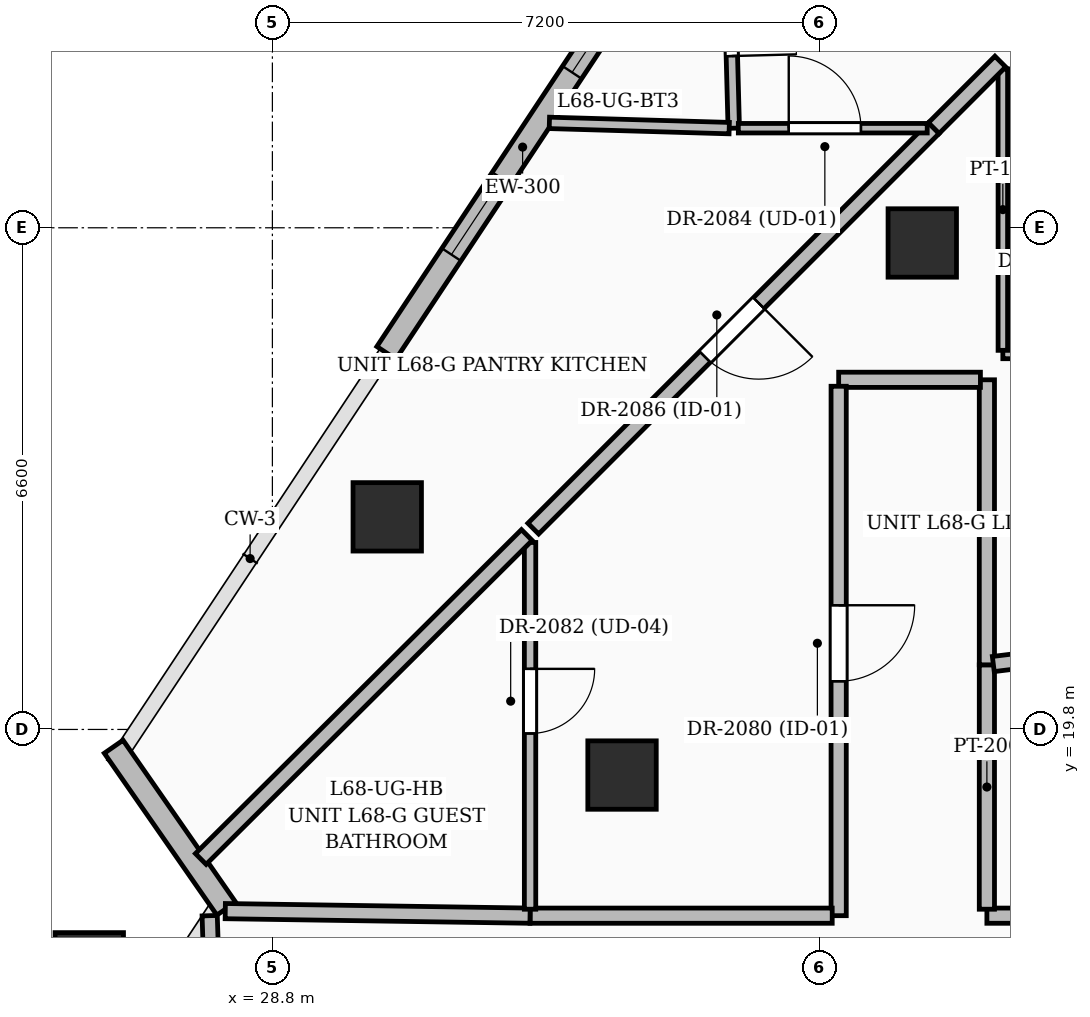
"""IFC4 building model, lengths in metres.
Left out: names, types, materials, properties, quantities, classifications, styles, units other than length and angle.
Written with IfcOpenShell. Run it as: python <this file> out.ifc"""

import sys

from ifc_helpers import new_model, si_unit, direction, frame, frame_2d, origin, origin_2d, place, context, subcontext, project, spatial, rectangle, extrude, element, fill, save


model = new_model("IFC4")
c1 = context("Model", 3, precision=1e-05, world=origin(), true_north=direction((0.0, 1.0)))
c2 = subcontext(c1, "Body", "Model", "MODEL_VIEW")
j1 = project(units=[si_unit("LENGTHUNIT", "METRE"), si_unit("PLANEANGLEUNIT", "RADIAN")], contexts=[c1])
p1 = place(None, origin())
s1 = spatial("IfcSite", under=j1, at=p1, CompositionType="ELEMENT")
p2 = place(p1, origin())
s2 = spatial("IfcBuilding", under=s1, at=p2, CompositionType="ELEMENT")
p3 = place(p2, frame((0.0, 0.0, 263.25)))
s3 = spatial("IfcBuildingStorey", under=s2, at=p3, CompositionType="ELEMENT", Elevation=263.25)
for number, where, z_axis, x_axis in (
    (1, (37.35, 26.2, 0.0), (0.0, 0.0, 1.0), (1.0, 0.0, 0.0)),
    (2, (33.4, 19.2, 0.0), (0.0, 0.0, 1.0), (1.0, 0.0, 0.0)),
    (3, (30.311, 22.597, 0.0), (0.0, 0.0, 1.0), (1.0, 0.0, 0.0)),
    (4, (26.391, 16.677, 0.0), (0.0, 0.0, 1.0), (1.0, 0.0, 0.0)),
):
    element("IfcColumn", number, at=place(p3, frame(where, z_axis=z_axis, x_axis=x_axis)), inside=s3, PredefinedType="COLUMN", context=c2, shape_type="SweptSolid", body=[
        extrude(rectangle(XDim=0.9, YDim=0.9, at=origin_2d()), origin(), (0.0, 0.0, 1.0), 3.75),
    ])
p4 = place(p3, frame((28.193, 17.443, 0.0), z_axis=(0.0, 0.0, 1.0), x_axis=(-0.570819039355, 0.821075894367, 0.0)))
e5 = element("IfcWall", 5, at=p4, inside=s3, PredefinedType="SOLIDWALL", context=c2, shape_type="SweptSolid", body=[
    extrude(rectangle(XDim=2.594, YDim=0.3, at=frame_2d((1.297, 0.0))), origin(), (0.0, 0.0, 1.0), 2.825),
])
p5 = place(p3, frame((30.3, 24.755, 0.0), z_axis=(0.0, 0.0, 1.0), x_axis=(0.552146443909, 0.833747146609, 0.0)))
e6 = element("IfcWall", 6, at=p5, inside=s3, PredefinedType="SOLIDWALL", context=c2, shape_type="SweptSolid", body=[
    extrude(rectangle(XDim=6.493, YDim=0.3, at=frame_2d((3.246, 0.0))), origin(), (0.0, 0.0, 1.0), 3.5),
])
p6 = place(p5, frame((4.425, 0.0, 0.8)))
e7 = element("IfcOpeningElement", 7, at=p6, cuts=e6, PredefinedType="OPENING", context=c2, shape_type="SweptSolid", body=[
    extrude(rectangle(XDim=1.2, YDim=1.8, at=frame_2d((0.6, 0.9))), frame((0.0, 0.16, 0.0), z_axis=(0.0, -1.0, 0.0), x_axis=(1.0, 0.0, 0.0)), (0.0, 0.0, 1.0), 0.32),
])
p7 = place(p5, frame((1.55, 0.0, 0.8)))
e8 = element("IfcOpeningElement", 8, at=p7, cuts=e6, PredefinedType="OPENING", context=c2, shape_type="SweptSolid", body=[
    extrude(rectangle(XDim=1.2, YDim=1.8, at=frame_2d((0.6, 0.9))), frame((0.0, 0.16, 0.0), z_axis=(0.0, -1.0, 0.0), x_axis=(1.0, 0.0, 0.0)), (0.0, 0.0, 1.0), 0.32),
])
p8 = place(p3, frame((27.975, 17.35, 0.0), z_axis=(0.0, 0.0, 1.0), x_axis=(0.032569486082, -0.999469473559, 0.0)))
e9 = element("IfcWall", 9, at=p8, inside=s3, PredefinedType="PARTITIONING", context=c2, shape_type="SweptSolid", body=[
    extrude(rectangle(XDim=2.301, YDim=0.2, at=frame_2d((1.151, 0.0))), origin(), (0.0, 0.0, 1.0), 3.5),
])
p9 = place(p8, frame((1.077, 0.0, 0.0)))
e10 = element("IfcOpeningElement", 10, at=p9, cuts=e9, PredefinedType="OPENING", context=c2, shape_type="SweptSolid", body=[
    extrude(rectangle(XDim=0.85, YDim=2.1, at=frame_2d((0.425, 1.05))), frame((0.0, 0.11, 0.0), z_axis=(0.0, -1.0, 0.0), x_axis=(1.0, 0.0, 0.0)), (0.0, 0.0, 1.0), 0.22),
])
p10 = place(p3, frame((44.0, 17.35, 0.0), z_axis=(0.0, 0.0, 1.0), x_axis=(-1.0, 0.0, 0.0)))
e11 = element("IfcWall", 11, at=p10, inside=s3, PredefinedType="PARTITIONING", context=c2, shape_type="SweptSolid", body=[
    extrude(rectangle(XDim=5.8, YDim=0.2, at=frame_2d((2.9, 0.0))), origin(), (0.0, 0.0, 1.0), 3.5),
])
p11 = place(p10, frame((2.391, 0.0, 0.0)))
e12 = element("IfcOpeningElement", 12, at=p11, cuts=e11, PredefinedType="OPENING", context=c2, shape_type="SweptSolid", body=[
    extrude(rectangle(XDim=0.9, YDim=2.1, at=frame_2d((0.45, 1.05))), frame((0.0, 0.11, 0.0), z_axis=(0.0, -1.0, 0.0), x_axis=(1.0, 0.0, 0.0)), (0.0, 0.0, 1.0), 0.22),
])
p12 = place(p3, frame((38.2, 17.435, 0.0), z_axis=(0.0, 0.0, 1.0), x_axis=(0.0, 1.0, 0.0)))
e13 = element("IfcWall", 13, at=p12, inside=s3, PredefinedType="PARTITIONING", context=c2, shape_type="SweptSolid", body=[
    extrude(rectangle(XDim=3.215, YDim=0.2, at=frame_2d((1.607, 0.0))), origin(), (0.0, 0.0, 1.0), 3.5),
])
p13 = place(p3, frame((38.2, 20.65, 0.0), z_axis=(0.0, 0.0, 1.0), x_axis=(0.0, 1.0, 0.0)))
e14 = element("IfcWall", 14, at=p13, inside=s3, PredefinedType="PARTITIONING", context=c2, shape_type="SweptSolid", body=[
    extrude(rectangle(XDim=3.75, YDim=0.2, at=frame_2d((1.875, 0.0))), origin(), (0.0, 0.0, 1.0), 3.5),
])
p14 = place(p3, frame((38.115, 24.4, 0.0), z_axis=(0.0, 0.0, 1.0), x_axis=(-1.0, 0.0, 0.0)))
e15 = element("IfcWall", 15, at=p14, inside=s3, PredefinedType="PARTITIONING", context=c2, shape_type="SweptSolid", body=[
    extrude(rectangle(XDim=1.865, YDim=0.2, at=frame_2d((0.933, 0.0))), origin(), (0.0, 0.0, 1.0), 2.685),
])
p15 = place(p3, frame((36.25, 24.315, 0.0), z_axis=(0.0, 0.0, 1.0), x_axis=(0.0, -1.0, 0.0)))
e16 = element("IfcWall", 16, at=p15, inside=s3, PredefinedType="PARTITIONING", context=c2, shape_type="SweptSolid", body=[
    extrude(rectangle(XDim=6.965, YDim=0.2, at=frame_2d((3.482, 0.0))), origin(), (0.0, 0.0, 1.0), 2.685),
])
p16 = place(p15, frame((2.881, 0.0, 0.0)))
e17 = element("IfcOpeningElement", 17, at=p16, cuts=e16, PredefinedType="OPENING", context=c2, shape_type="SweptSolid", body=[
    extrude(rectangle(XDim=1.0, YDim=2.2, at=frame_2d((0.5, 1.1))), frame((0.0, 0.11, 0.0), z_axis=(0.0, -1.0, 0.0), x_axis=(1.0, 0.0, 0.0)), (0.0, 0.0, 1.0), 0.22),
])
p17 = place(p3, frame((36.165, 17.35, 0.0), z_axis=(0.0, 0.0, 1.0), x_axis=(-1.0, 0.0, 0.0)))
e18 = element("IfcWall", 18, at=p17, inside=s3, PredefinedType="PARTITIONING", context=c2, shape_type="SweptSolid", body=[
    extrude(rectangle(XDim=3.975, YDim=0.2, at=frame_2d((1.988, 0.0))), origin(), (0.0, 0.0, 1.0), 2.685),
])
p18 = place(p3, frame((32.19, 17.35, 0.0), z_axis=(0.0, 0.0, 1.0), x_axis=(-0.999888770764, 0.014914627022, 0.0)))
e19 = element("IfcWall", 19, at=p18, inside=s3, PredefinedType="PARTITIONING", context=c2, shape_type="SweptSolid", body=[
    extrude(rectangle(XDim=4.01, YDim=0.2, at=frame_2d((2.005, 0.0))), origin(), (0.0, 0.0, 1.0), 3.5),
])
p19 = place(p3, frame((43.12, 21.26, 0.0), z_axis=(0.0, 0.0, 1.0), x_axis=(-0.992399953156, -0.123054187154, 0.0)))
e20 = element("IfcWall", 20, at=p19, inside=s3, PredefinedType="PARTITIONING", context=c2, shape_type="SweptSolid", body=[
    extrude(rectangle(XDim=4.873, YDim=0.2, at=frame_2d((2.437, 0.0))), origin(), (0.0, 0.0, 1.0), 3.5),
])
p20 = place(p3, frame((32.19, 22.26, 0.0), z_axis=(0.0, 0.0, 1.0), x_axis=(0.0, -1.0, 0.0)))
e21 = element("IfcWall", 21, at=p20, inside=s3, PredefinedType="PARTITIONING", context=c2, shape_type="SweptSolid", body=[
    extrude(rectangle(XDim=4.825, YDim=0.15, at=frame_2d((2.413, 0.0))), origin(), (0.0, 0.0, 1.0), 2.764),
])
p21 = place(p20, frame((1.663, 0.0, 0.0)))
e22 = element("IfcOpeningElement", 22, at=p21, cuts=e21, PredefinedType="OPENING", context=c2, shape_type="SweptSolid", body=[
    extrude(rectangle(XDim=0.85, YDim=2.1, at=frame_2d((0.425, 1.05))), frame((0.0, 0.085, 0.0), z_axis=(0.0, -1.0, 0.0), x_axis=(1.0, 0.0, 0.0)), (0.0, 0.0, 1.0), 0.17),
])
p22 = place(p3, frame((42.56, 24.74, 0.0), z_axis=(0.0, 0.0, 1.0), x_axis=(-1.0, 0.0, 0.0)))
e23 = element("IfcWall", 23, at=p22, inside=s3, PredefinedType="PARTITIONING", context=c2, shape_type="SweptSolid", body=[
    extrude(rectangle(XDim=4.15, YDim=0.125, at=frame_2d((2.075, 0.0))), origin(), (0.0, 0.0, 1.0), 3.5),
])
p23 = place(p22, frame((1.658, 0.0, 0.0)))
e24 = element("IfcOpeningElement", 24, at=p23, cuts=e23, PredefinedType="OPENING", context=c2, shape_type="SweptSolid", body=[
    extrude(rectangle(XDim=0.95, YDim=2.2, at=frame_2d((0.475, 1.1))), frame((0.0, 0.072, 0.0), z_axis=(0.0, -1.0, 0.0), x_axis=(1.0, 0.0, 0.0)), (0.0, 0.0, 1.0), 0.145),
])
p24 = place(p3, frame((38.41, 24.788, 0.0), z_axis=(0.0, 0.0, 1.0), x_axis=(0.0, 1.0, 0.0)))
e25 = element("IfcWall", 25, at=p24, inside=s3, PredefinedType="PARTITIONING", context=c2, shape_type="SweptSolid", body=[
    extrude(rectangle(XDim=3.702, YDim=0.125, at=frame_2d((1.851, 0.0))), origin(), (0.0, 0.0, 1.0), 2.52),
])
p25 = place(p3, frame((38.376, 28.586, 0.0), z_axis=(0.0, 0.0, 1.0), x_axis=(-0.707106781187, -0.707106781187, 0.0)))
e26 = element("IfcWall", 26, at=p25, inside=s3, PredefinedType="PARTITIONING", context=c2, shape_type="SweptSolid", body=[
    extrude(rectangle(XDim=1.24, YDim=0.2, at=frame_2d((0.62, 0.0))), origin(), (0.0, 0.0, 1.0), 3.5),
])
p26 = place(p3, frame((37.5, 27.71, 0.0), z_axis=(0.0, 0.0, 1.0), x_axis=(-0.707106781187, -0.707106781187, 0.0)))
e27 = element("IfcWall", 27, at=p26, inside=s3, PredefinedType="PARTITIONING", context=c2, shape_type="SweptSolid", body=[
    extrude(rectangle(XDim=7.449, YDim=0.2, at=frame_2d((3.725, 0.0))), origin(), (0.0, 0.0, 1.0), 2.764),
])
p27 = place(p26, frame((3.255, 0.0, 0.0)))
e28 = element("IfcOpeningElement", 28, at=p27, cuts=e27, PredefinedType="OPENING", context=c2, shape_type="SweptSolid", body=[
    extrude(rectangle(XDim=1.0, YDim=2.2, at=frame_2d((0.5, 1.1))), frame((0.0, 0.11, 0.0), z_axis=(0.0, -1.0, 0.0), x_axis=(1.0, 0.0, 0.0)), (0.0, 0.0, 1.0), 0.22),
])
p28 = place(p3, frame((32.147, 22.358, 0.0), z_axis=(0.0, 0.0, 1.0), x_axis=(-0.709404461914, -0.70480160997, 0.0)))
e29 = element("IfcWall", 29, at=p28, inside=s3, PredefinedType="PARTITIONING", context=c2, shape_type="SweptSolid", body=[
    extrude(rectangle(XDim=6.047, YDim=0.2, at=frame_2d((3.023, 0.0))), origin(), (0.0, 0.0, 1.0), 2.764),
])
p29 = place(p3, frame((34.776, 31.252, 0.0), z_axis=(0.0, 0.0, 1.0), x_axis=(0.026596598545, -0.999646247903, 0.0)))
e30 = element("IfcWall", 30, at=p29, inside=s3, PredefinedType="PARTITIONING", context=c2, shape_type="SweptSolid", body=[
    extrude(rectangle(XDim=3.543, YDim=0.15, at=frame_2d((1.771, 0.0))), origin(), (0.0, 0.0, 1.0), 2.82),
])
p30 = place(p29, frame((1.744, 0.0, 0.0)))
e31 = element("IfcOpeningElement", 31, at=p30, cuts=e30, PredefinedType="OPENING", context=c2, shape_type="SweptSolid", body=[
    extrude(rectangle(XDim=0.85, YDim=2.1, at=frame_2d((0.425, 1.05))), frame((0.0, 0.085, 0.0), z_axis=(0.0, -1.0, 0.0), x_axis=(1.0, 0.0, 0.0)), (0.0, 0.0, 1.0), 0.17),
])
p31 = place(p3, frame((34.93, 27.71, 0.0), z_axis=(0.0, 0.0, 1.0), x_axis=(1.0, 0.0, 0.0)))
e32 = element("IfcWall", 32, at=p31, inside=s3, PredefinedType="PARTITIONING", context=c2, shape_type="SweptSolid", body=[
    extrude(rectangle(XDim=2.485, YDim=0.125, at=frame_2d((1.243, 0.0))), origin(), (0.0, 0.0, 1.0), 2.764),
])
p32 = place(p31, frame((0.663, 0.0, 0.0)))
e33 = element("IfcOpeningElement", 33, at=p32, cuts=e32, PredefinedType="OPENING", context=c2, shape_type="SweptSolid", body=[
    extrude(rectangle(XDim=0.95, YDim=2.2, at=frame_2d((0.475, 1.1))), frame((0.0, 0.072, 0.0), z_axis=(0.0, -1.0, 0.0), x_axis=(1.0, 0.0, 0.0)), (0.0, 0.0, 1.0), 0.145),
])
p33 = place(p3, frame((32.444, 27.78, 0.0), z_axis=(0.0, 0.0, 1.0), x_axis=(0.999576888009, -0.029086851968, 0.0)))
e34 = element("IfcWall", 34, at=p33, inside=s3, PredefinedType="PARTITIONING", context=c2, shape_type="SweptSolid", body=[
    extrude(rectangle(XDim=2.367, YDim=0.15, at=frame_2d((1.184, 0.0))), origin(), (0.0, 0.0, 1.0), 2.82),
])
p34 = place(p6, origin())
e35 = element("IfcWindow", 35, at=p34, inside=s3, PartitioningType="SINGLE_PANEL", PredefinedType="WINDOW", context=c2, shape_type="SweptSolid", body=[
    extrude(rectangle(XDim=1.2, YDim=1.8, at=frame_2d((0.6, 0.9))), frame((0.0, 0.03, 0.0), z_axis=(0.0, -1.0, 0.0), x_axis=(1.0, 0.0, 0.0)), (0.0, 0.0, 1.0), 0.06),
])
fill(e7, e35)
p35 = place(p7, origin())
e36 = element("IfcWindow", 36, at=p35, inside=s3, PartitioningType="SINGLE_PANEL", PredefinedType="WINDOW", context=c2, shape_type="SweptSolid", body=[
    extrude(rectangle(XDim=1.2, YDim=1.8, at=frame_2d((0.6, 0.9))), frame((0.0, 0.03, 0.0), z_axis=(0.0, -1.0, 0.0), x_axis=(1.0, 0.0, 0.0)), (0.0, 0.0, 1.0), 0.06),
])
fill(e8, e36)
p36 = place(p16, origin())
e37 = element("IfcDoor", 37, at=p36, inside=s3, OperationType="SINGLE_SWING_LEFT", PredefinedType="DOOR", context=c2, shape_type="SweptSolid", body=[
    extrude(rectangle(XDim=1.0, YDim=2.2, at=frame_2d((0.5, 1.1))), frame((0.0, 0.025, 0.0), z_axis=(0.0, -1.0, 0.0), x_axis=(1.0, 0.0, 0.0)), (0.0, 0.0, 1.0), 0.05),
])
fill(e17, e37)
p37 = place(p21, origin())
e38 = element("IfcDoor", 38, at=p37, inside=s3, OperationType="SINGLE_SWING_LEFT", PredefinedType="DOOR", context=c2, shape_type="SweptSolid", body=[
    extrude(rectangle(XDim=0.85, YDim=2.1, at=frame_2d((0.425, 1.05))), frame((0.0, 0.025, 0.0), z_axis=(0.0, -1.0, 0.0), x_axis=(1.0, 0.0, 0.0)), (0.0, 0.0, 1.0), 0.05),
])
fill(e22, e38)
p38 = place(p32, origin())
e39 = element("IfcDoor", 39, at=p38, inside=s3, OperationType="SINGLE_SWING_LEFT", PredefinedType="DOOR", context=c2, shape_type="SweptSolid", body=[
    extrude(rectangle(XDim=0.95, YDim=2.2, at=frame_2d((0.475, 1.1))), frame((0.0, 0.025, 0.0), z_axis=(0.0, -1.0, 0.0), x_axis=(1.0, 0.0, 0.0)), (0.0, 0.0, 1.0), 0.05),
])
fill(e33, e39)
p39 = place(p30, origin())
e40 = element("IfcDoor", 40, at=p39, inside=s3, OperationType="SINGLE_SWING_RIGHT", PredefinedType="DOOR", context=c2, shape_type="SweptSolid", body=[
    extrude(rectangle(XDim=0.85, YDim=2.1, at=frame_2d((0.425, 1.05))), frame((0.0, 0.025, 0.0), z_axis=(0.0, -1.0, 0.0), x_axis=(1.0, 0.0, 0.0)), (0.0, 0.0, 1.0), 0.05),
])
fill(e31, e40)
p40 = place(p27, origin())
e41 = element("IfcDoor", 41, at=p40, inside=s3, OperationType="SINGLE_SWING_LEFT", PredefinedType="DOOR", context=c2, shape_type="SweptSolid", body=[
    extrude(rectangle(XDim=1.0, YDim=2.2, at=frame_2d((0.5, 1.1))), frame((0.0, 0.025, 0.0), z_axis=(0.0, -1.0, 0.0), x_axis=(1.0, 0.0, 0.0)), (0.0, 0.0, 1.0), 0.05),
])
fill(e28, e41)
save(model, sys.argv[1])
